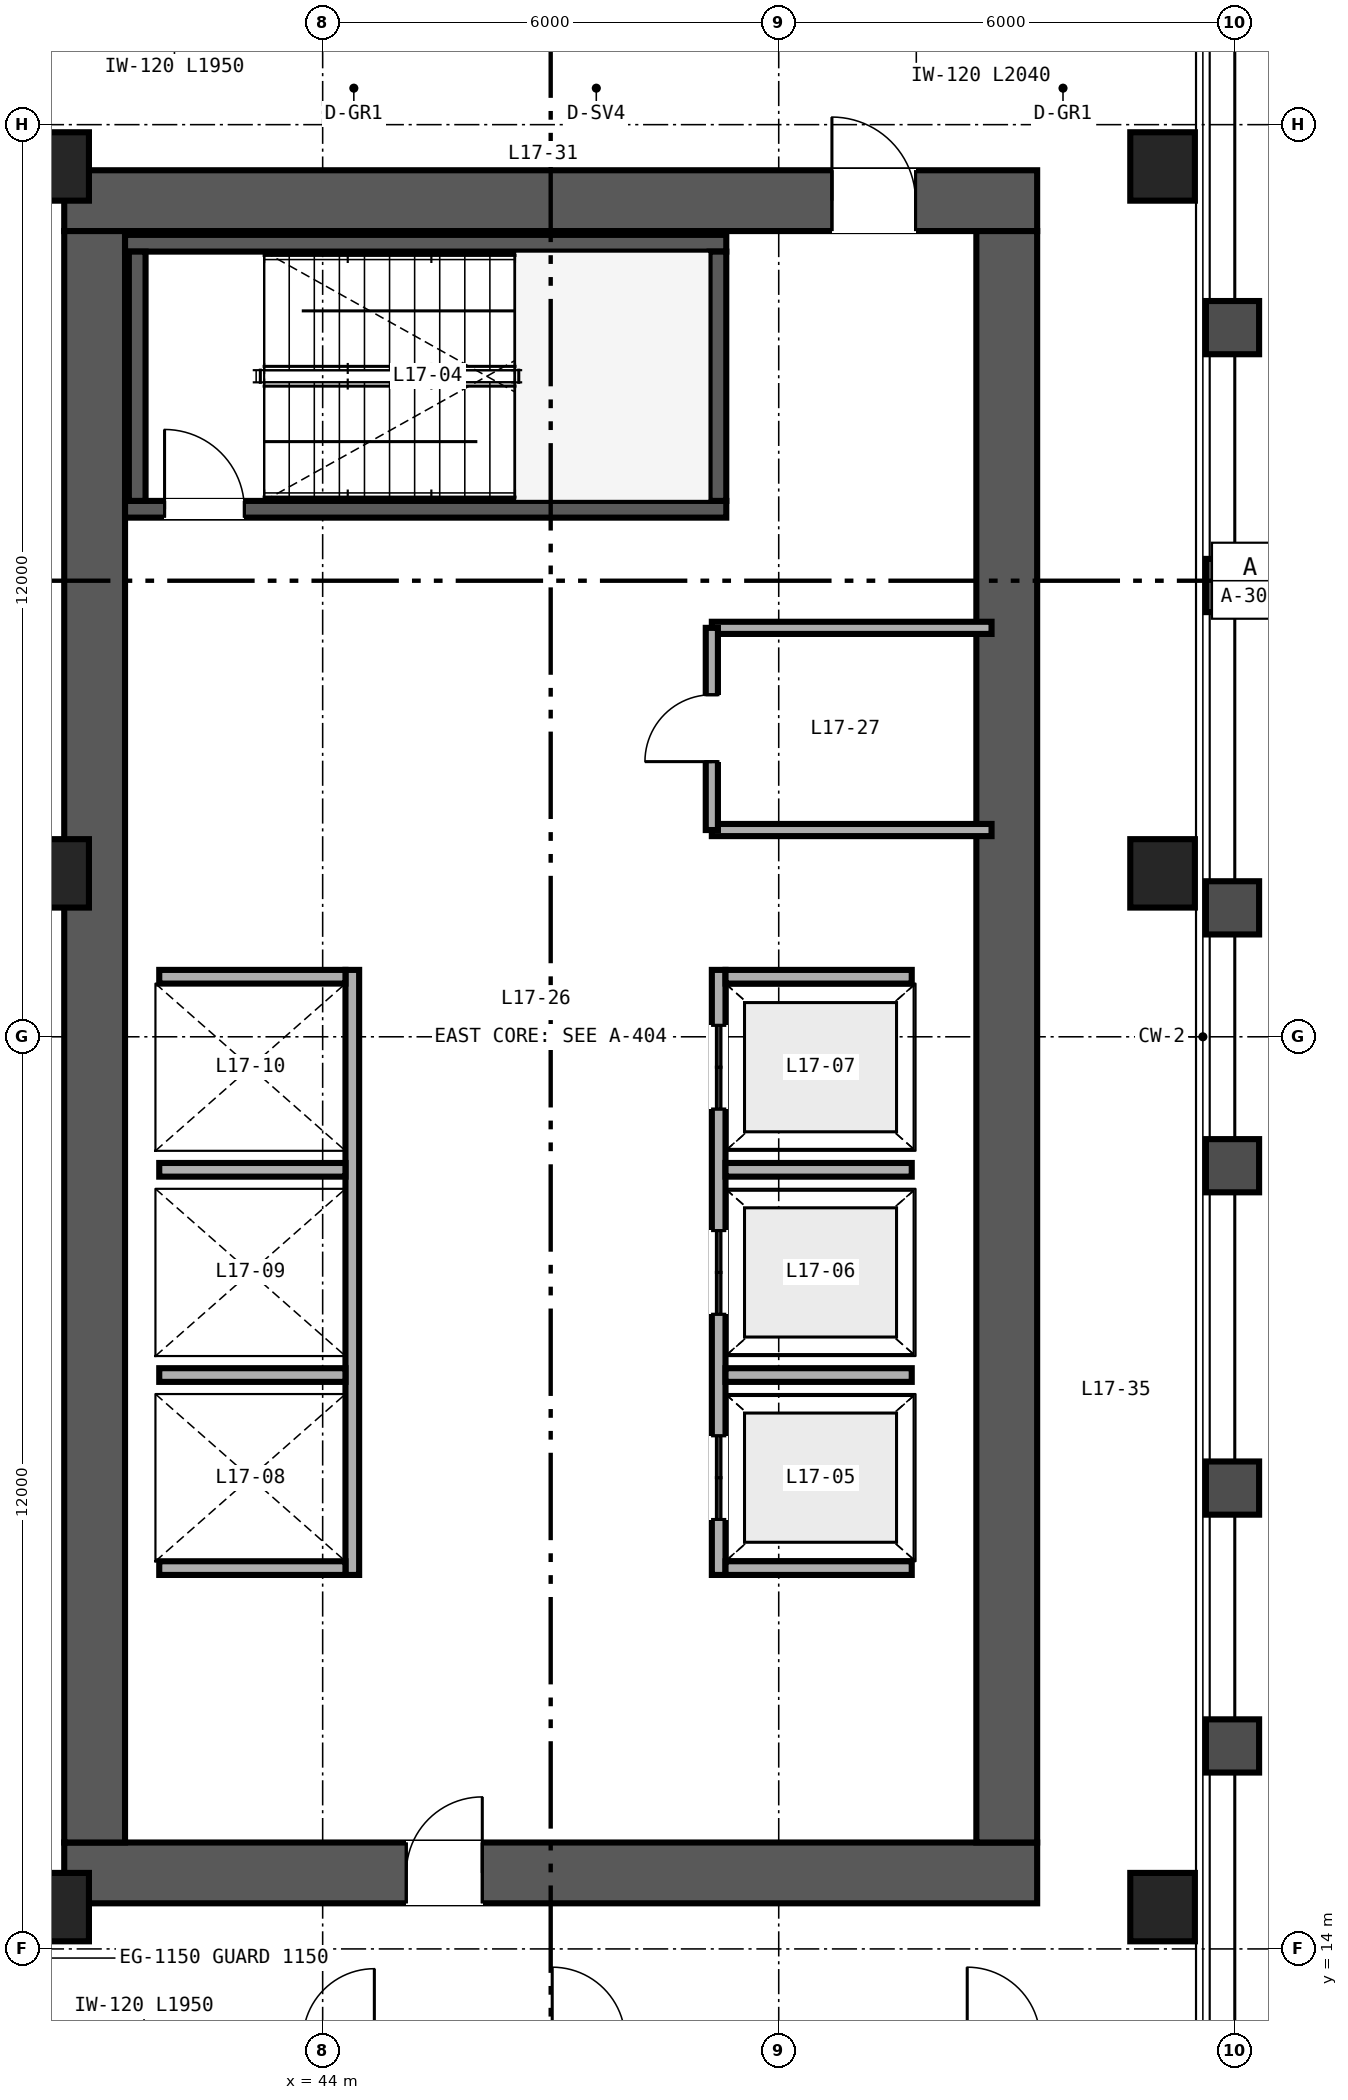
"""IFC4 building model, lengths in metres.
Left out: names, types, materials, properties, quantities, classifications, styles, units other than length and angle.
Written with IfcOpenShell. Run it as: python <this file> out.ifc"""

import sys

from ifc_helpers import new_model, si_unit, direction, frame, frame_2d, origin, origin_2d, place, context, subcontext, project, spatial, rectangle, hollow_rectangle, extrude, source, transform, mapped, element, fill, save


model = new_model("IFC4")
c1 = context("Model", 3, precision=1e-05, world=origin(), true_north=direction((0.0, 1.0)))
c2 = subcontext(c1, "Body", "Model", "MODEL_VIEW")
j1 = project(units=[si_unit("LENGTHUNIT", "METRE"), si_unit("PLANEANGLEUNIT", "RADIAN")], contexts=[c1])
p1 = place(None, origin())
s1 = spatial("IfcSite", under=j1, at=p1, CompositionType="ELEMENT")
p2 = place(p1, origin())
s2 = spatial("IfcBuilding", under=s1, at=p2, CompositionType="ELEMENT")
p3 = place(p2, frame((0.0, 0.0, 70.8)))
s3 = spatial("IfcBuildingStorey", under=s2, at=p3, CompositionType="ELEMENT", Elevation=70.8)
p4 = place(p3, frame((40.6, 15.0, 0.0), z_axis=(0.0, 0.0, 1.0), x_axis=(1.0, 0.0, 0.0)))
e1 = element("IfcWall", 1, at=p4, inside=s3, PredefinedType="SHEAR", context=c2, shape_type="SweptSolid", body=[
    extrude(rectangle(XDim=12.8, YDim=0.8, at=frame_2d((6.4, 0.0))), origin(), (0.0, 0.0, 1.0), 3.35),
])
p5 = place(p4, frame((4.5, 0.0, 0.0)))
e2 = element("IfcOpeningElement", 2, at=p5, cuts=e1, PredefinedType="OPENING", context=c2, shape_type="SweptSolid", body=[
    extrude(rectangle(XDim=1.0, YDim=2.15, at=frame_2d((0.5, 1.075))), frame((0.0, 0.41, 0.0), z_axis=(0.0, -1.0, 0.0), x_axis=(1.0, 0.0, 0.0)), (0.0, 0.0, 1.0), 0.82),
])
p6 = place(p3, frame((40.6, 37.0, 0.0), z_axis=(0.0, 0.0, 1.0), x_axis=(1.0, 0.0, 0.0)))
e3 = element("IfcWall", 3, at=p6, inside=s3, PredefinedType="SHEAR", context=c2, shape_type="SweptSolid", body=[
    extrude(rectangle(XDim=12.8, YDim=0.8, at=frame_2d((6.4, 0.0))), origin(), (0.0, 0.0, 1.0), 3.35),
])
p7 = place(p6, frame((10.1, 0.0, 0.0)))
e4 = element("IfcOpeningElement", 4, at=p7, cuts=e3, PredefinedType="OPENING", context=c2, shape_type="SweptSolid", body=[
    extrude(rectangle(XDim=1.1, YDim=2.15, at=frame_2d((0.55, 1.075))), frame((0.0, 0.41, 0.0), z_axis=(0.0, -1.0, 0.0), x_axis=(1.0, 0.0, 0.0)), (0.0, 0.0, 1.0), 0.82),
])
for number, where, z_axis, x_axis in (
    (5, (41.0, 15.4, 0.0), (0.0, 0.0, 1.0), (0.0, 1.0, 0.0)),
    (6, (53.0, 15.4, 0.0), (0.0, 0.0, 1.0), (0.0, 1.0, 0.0)),
):
    element("IfcWall", number, at=place(p3, frame(where, z_axis=z_axis, x_axis=x_axis)), inside=s3, PredefinedType="SHEAR", context=c2, shape_type="SweptSolid", body=[
        extrude(rectangle(XDim=21.2, YDim=0.8, at=frame_2d((10.6, 0.0))), origin(), (0.0, 0.0, 1.0), 3.35),
    ])
p8 = place(p3, frame((41.4, 32.94, 0.0), z_axis=(0.0, 0.0, 1.0), x_axis=(1.0, 0.0, 0.0)))
e7 = element("IfcWall", 7, at=p8, inside=s3, PredefinedType="SHEAR", context=c2, shape_type="SweptSolid", body=[
    extrude(rectangle(XDim=7.91, YDim=0.22, at=frame_2d((3.955, 0.0))), origin(), (0.0, 0.0, 1.0), 3.4),
])
p9 = place(p8, frame((0.52, 0.0, 0.0)))
e8 = element("IfcOpeningElement", 8, at=p9, cuts=e7, PredefinedType="OPENING", context=c2, shape_type="SweptSolid", body=[
    extrude(rectangle(XDim=1.05, YDim=2.15, at=frame_2d((0.525, 1.075))), frame((0.0, 0.12, 0.0), z_axis=(0.0, -1.0, 0.0), x_axis=(1.0, 0.0, 0.0)), (0.0, 0.0, 1.0), 0.24),
])
p10 = place(p3, frame((41.4, 36.44, 0.0), z_axis=(0.0, 0.0, 1.0), x_axis=(1.0, 0.0, 0.0)))
e9 = element("IfcWall", 9, at=p10, inside=s3, PredefinedType="SHEAR", context=c2, shape_type="SweptSolid", body=[
    extrude(rectangle(XDim=7.91, YDim=0.22, at=frame_2d((3.955, 0.0))), origin(), (0.0, 0.0, 1.0), 3.4),
])
for number, where, z_axis, x_axis in (
    (10, (41.56, 33.05, 0.0), (0.0, 0.0, 1.0), (0.0, 1.0, 0.0)),
    (11, (49.2, 33.05, 0.0), (0.0, 0.0, 1.0), (0.0, 1.0, 0.0)),
):
    element("IfcWall", number, at=place(p3, frame(where, z_axis=z_axis, x_axis=x_axis)), inside=s3, PredefinedType="SHEAR", context=c2, shape_type="SweptSolid", body=[
        extrude(rectangle(XDim=3.28, YDim=0.22, at=frame_2d((1.64, 0.0))), origin(), (0.0, 0.0, 1.0), 3.4),
    ])
m1 = source(origin(), c2, "Body", "SweptSolid", [
    extrude(hollow_rectangle(XDim=0.85, YDim=0.9, WallThickness=0.04, at=origin_2d()), origin(), (0.0, 0.0, 1.0), 3.35),
])
for number, where, z_axis, x_axis in (
    (12, (40.5, 14.55, 0.0), (0.0, 0.0, 1.0), (1.0, 0.0, 0.0)),
    (13, (55.05, 14.55, 0.0), (0.0, 0.0, 1.0), (1.0, 0.0, 0.0)),
    (14, (40.5, 28.15, 0.0), (0.0, 0.0, 1.0), (1.0, 0.0, 0.0)),
    (15, (55.05, 28.15, 0.0), (0.0, 0.0, 1.0), (1.0, 0.0, 0.0)),
    (16, (40.5, 37.45, 0.0), (0.0, 0.0, 1.0), (1.0, 0.0, 0.0)),
    (17, (55.05, 37.45, 0.0), (0.0, 0.0, 1.0), (1.0, 0.0, 0.0)),
):
    element("IfcColumn", number, at=place(p3, frame(where, z_axis=z_axis, x_axis=x_axis)), inside=s3, PredefinedType="COLUMN", context=c2, shape_type="MappedRepresentation", body=[
        mapped(m1, transform((0.0, 0.0, 0.0), scale=1.0)),
    ])
p11 = place(p3, frame((49.21, 18.92, 0.0), z_axis=(0.0, 0.0, 1.0), x_axis=(0.0, 1.0, 0.0)))
e18 = element("IfcWall", 18, at=p11, inside=s3, PredefinedType="SOLIDWALL", context=c2, shape_type="SweptSolid", body=[
    extrude(rectangle(XDim=7.96, YDim=0.18, at=frame_2d((3.98, 0.0))), origin(), (0.0, 0.0, 1.0), 3.35),
])
p12 = place(p11, frame((0.73, 0.0, 0.0)))
e19 = element("IfcOpeningElement", 19, at=p12, cuts=e18, PredefinedType="OPENING", context=c2, shape_type="SweptSolid", body=[
    extrude(rectangle(XDim=1.1, YDim=2.2, at=frame_2d((0.55, 1.1))), frame((0.0, 0.1, 0.0), z_axis=(0.0, -1.0, 0.0), x_axis=(1.0, 0.0, 0.0)), (0.0, 0.0, 1.0), 0.2),
])
p13 = place(p11, frame((3.43, 0.0, 0.0)))
e20 = element("IfcOpeningElement", 20, at=p13, cuts=e18, PredefinedType="OPENING", context=c2, shape_type="SweptSolid", body=[
    extrude(rectangle(XDim=1.1, YDim=2.2, at=frame_2d((0.55, 1.1))), frame((0.0, 0.1, 0.0), z_axis=(0.0, -1.0, 0.0), x_axis=(1.0, 0.0, 0.0)), (0.0, 0.0, 1.0), 0.2),
])
p14 = place(p11, frame((6.13, 0.0, 0.0)))
e21 = element("IfcOpeningElement", 21, at=p14, cuts=e18, PredefinedType="OPENING", context=c2, shape_type="SweptSolid", body=[
    extrude(rectangle(XDim=1.1, YDim=2.2, at=frame_2d((0.55, 1.1))), frame((0.0, 0.1, 0.0), z_axis=(0.0, -1.0, 0.0), x_axis=(1.0, 0.0, 0.0)), (0.0, 0.0, 1.0), 0.2),
])
for number, where, z_axis, x_axis in (
    (22, (49.3, 19.01, 0.0), (0.0, 0.0, 1.0), (1.0, 0.0, 0.0)),
    (23, (49.3, 26.79, 0.0), (0.0, 0.0, 1.0), (1.0, 0.0, 0.0)),
    (24, (49.3, 21.55, 0.0), (0.0, 0.0, 1.0), (1.0, 0.0, 0.0)),
    (25, (49.3, 24.25, 0.0), (0.0, 0.0, 1.0), (1.0, 0.0, 0.0)),
):
    element("IfcWall", number, at=place(p3, frame(where, z_axis=z_axis, x_axis=x_axis)), inside=s3, PredefinedType="SOLIDWALL", context=c2, shape_type="SweptSolid", body=[
        extrude(rectangle(XDim=2.45, YDim=0.18, at=frame_2d((1.225, 0.0))), origin(), (0.0, 0.0, 1.0), 3.35),
    ])
p15 = place(p3, frame((44.39, 18.92, 0.0), z_axis=(0.0, 0.0, 1.0), x_axis=(0.0, 1.0, 0.0)))
e26 = element("IfcWall", 26, at=p15, inside=s3, PredefinedType="SOLIDWALL", context=c2, shape_type="SweptSolid", body=[
    extrude(rectangle(XDim=7.96, YDim=0.18, at=frame_2d((3.98, 0.0))), origin(), (0.0, 0.0, 1.0), 3.35),
])
for number, where, z_axis, x_axis in (
    (27, (41.85, 19.01, 0.0), (0.0, 0.0, 1.0), (1.0, 0.0, 0.0)),
    (28, (41.85, 26.79, 0.0), (0.0, 0.0, 1.0), (1.0, 0.0, 0.0)),
    (29, (41.85, 21.55, 0.0), (0.0, 0.0, 1.0), (1.0, 0.0, 0.0)),
    (30, (41.85, 24.25, 0.0), (0.0, 0.0, 1.0), (1.0, 0.0, 0.0)),
):
    element("IfcWall", number, at=place(p3, frame(where, z_axis=z_axis, x_axis=x_axis)), inside=s3, PredefinedType="SOLIDWALL", context=c2, shape_type="SweptSolid", body=[
        extrude(rectangle(XDim=2.45, YDim=0.18, at=frame_2d((1.225, 0.0))), origin(), (0.0, 0.0, 1.0), 3.35),
    ])
p16 = place(p3, frame((49.12, 28.72, 0.0), z_axis=(0.0, 0.0, 1.0), x_axis=(1.0, 0.0, 0.0)))
e31 = element("IfcWall", 31, at=p16, inside=s3, PredefinedType="PARTITIONING", context=c2, shape_type="SweptSolid", body=[
    extrude(rectangle(XDim=3.68, YDim=0.16, at=frame_2d((1.84, 0.0))), origin(), (0.0, 0.0, 1.0), 3.35),
])
p17 = place(p3, frame((49.12, 31.38, 0.0), z_axis=(0.0, 0.0, 1.0), x_axis=(1.0, 0.0, 0.0)))
e32 = element("IfcWall", 32, at=p17, inside=s3, PredefinedType="PARTITIONING", context=c2, shape_type="SweptSolid", body=[
    extrude(rectangle(XDim=3.68, YDim=0.16, at=frame_2d((1.84, 0.0))), origin(), (0.0, 0.0, 1.0), 2.36),
])
p18 = place(p3, frame((49.12, 28.72, 0.0), z_axis=(0.0, 0.0, 1.0), x_axis=(0.0, 1.0, 0.0)))
e33 = element("IfcWall", 33, at=p18, inside=s3, PredefinedType="PARTITIONING", context=c2, shape_type="SweptSolid", body=[
    extrude(rectangle(XDim=2.66, YDim=0.16, at=frame_2d((1.33, 0.0))), origin(), (0.0, 0.0, 1.0), 2.36),
])
p19 = place(p18, frame((0.9, 0.0, 0.0)))
e34 = element("IfcOpeningElement", 34, at=p19, cuts=e33, PredefinedType="OPENING", context=c2, shape_type="SweptSolid", body=[
    extrude(rectangle(XDim=0.88, YDim=2.15, at=frame_2d((0.44, 1.075))), frame((0.0, 0.09, 0.0), z_axis=(0.0, -1.0, 0.0), x_axis=(1.0, 0.0, 0.0)), (0.0, 0.0, 1.0), 0.18),
])
m2 = source(origin(), c2, "Body", "SweptSolid", [
    extrude(rectangle(XDim=1.05, YDim=2.15, at=frame_2d((0.525, 1.075))), frame((0.0, 0.025, 0.0), z_axis=(0.0, -1.0, 0.0), x_axis=(1.0, 0.0, 0.0)), (0.0, 0.0, 1.0), 0.05),
])
p20 = place(p9, origin())
e35 = element("IfcDoor", 35, at=p20, inside=s3, OperationType="SINGLE_SWING_LEFT", PredefinedType="DOOR", context=c2, shape_type="MappedRepresentation", body=[
    mapped(m2, transform((0.0, 0.0, 0.0), scale=1.0)),
])
fill(e8, e35)
m3 = source(origin(), c2, "Body", "SweptSolid", [
    extrude(rectangle(XDim=1.1, YDim=2.2, at=frame_2d((0.55, 1.1))), frame((0.0, 0.025, 0.0), z_axis=(0.0, -1.0, 0.0), x_axis=(1.0, 0.0, 0.0)), (0.0, 0.0, 1.0), 0.05),
])
p21 = place(p12, origin())
e36 = element("IfcDoor", 36, at=p21, inside=s3, OperationType="DOUBLE_DOOR_SLIDING", PredefinedType="DOOR", context=c2, shape_type="MappedRepresentation", body=[
    mapped(m3, transform((0.0, 0.0, 0.0), scale=1.0)),
])
fill(e19, e36)
p22 = place(p13, origin())
e37 = element("IfcDoor", 37, at=p22, inside=s3, OperationType="DOUBLE_DOOR_SLIDING", PredefinedType="DOOR", context=c2, shape_type="MappedRepresentation", body=[
    mapped(m3, transform((0.0, 0.0, 0.0), scale=1.0)),
])
fill(e20, e37)
p23 = place(p14, origin())
e38 = element("IfcDoor", 38, at=p23, inside=s3, OperationType="DOUBLE_DOOR_SLIDING", PredefinedType="DOOR", context=c2, shape_type="MappedRepresentation", body=[
    mapped(m3, transform((0.0, 0.0, 0.0), scale=1.0)),
])
fill(e21, e38)
m4 = source(origin(), c2, "Body", "SweptSolid", [
    extrude(rectangle(XDim=1.0, YDim=2.15, at=frame_2d((0.5, 1.075))), frame((0.0, 0.025, 0.0), z_axis=(0.0, -1.0, 0.0), x_axis=(1.0, 0.0, 0.0)), (0.0, 0.0, 1.0), 0.05),
])
p24 = place(p5, origin())
e39 = element("IfcDoor", 39, at=p24, inside=s3, OperationType="SINGLE_SWING_RIGHT", PredefinedType="DOOR", context=c2, shape_type="MappedRepresentation", body=[
    mapped(m4, transform((0.0, 0.0, 0.0), scale=1.0)),
])
fill(e2, e39)
m5 = source(origin(), c2, "Body", "SweptSolid", [
    extrude(rectangle(XDim=1.1, YDim=2.15, at=frame_2d((0.55, 1.075))), frame((0.0, 0.025, 0.0), z_axis=(0.0, -1.0, 0.0), x_axis=(1.0, 0.0, 0.0)), (0.0, 0.0, 1.0), 0.05),
])
p25 = place(p7, origin())
e40 = element("IfcDoor", 40, at=p25, inside=s3, OperationType="SINGLE_SWING_LEFT", PredefinedType="DOOR", context=c2, shape_type="MappedRepresentation", body=[
    mapped(m5, transform((0.0, 0.0, 0.0), scale=1.0)),
])
fill(e4, e40)
m6 = source(origin(), c2, "Body", "SweptSolid", [
    extrude(rectangle(XDim=0.88, YDim=2.15, at=frame_2d((0.44, 1.075))), frame((0.0, 0.025, 0.0), z_axis=(0.0, -1.0, 0.0), x_axis=(1.0, 0.0, 0.0)), (0.0, 0.0, 1.0), 0.05),
])
p26 = place(p19, origin())
e41 = element("IfcDoor", 41, at=p26, inside=s3, OperationType="SINGLE_SWING_LEFT", PredefinedType="DOOR", context=c2, shape_type="MappedRepresentation", body=[
    mapped(m6, transform((0.0, 0.0, 0.0), scale=1.0)),
])
fill(e34, e41)
save(model, sys.argv[1])
